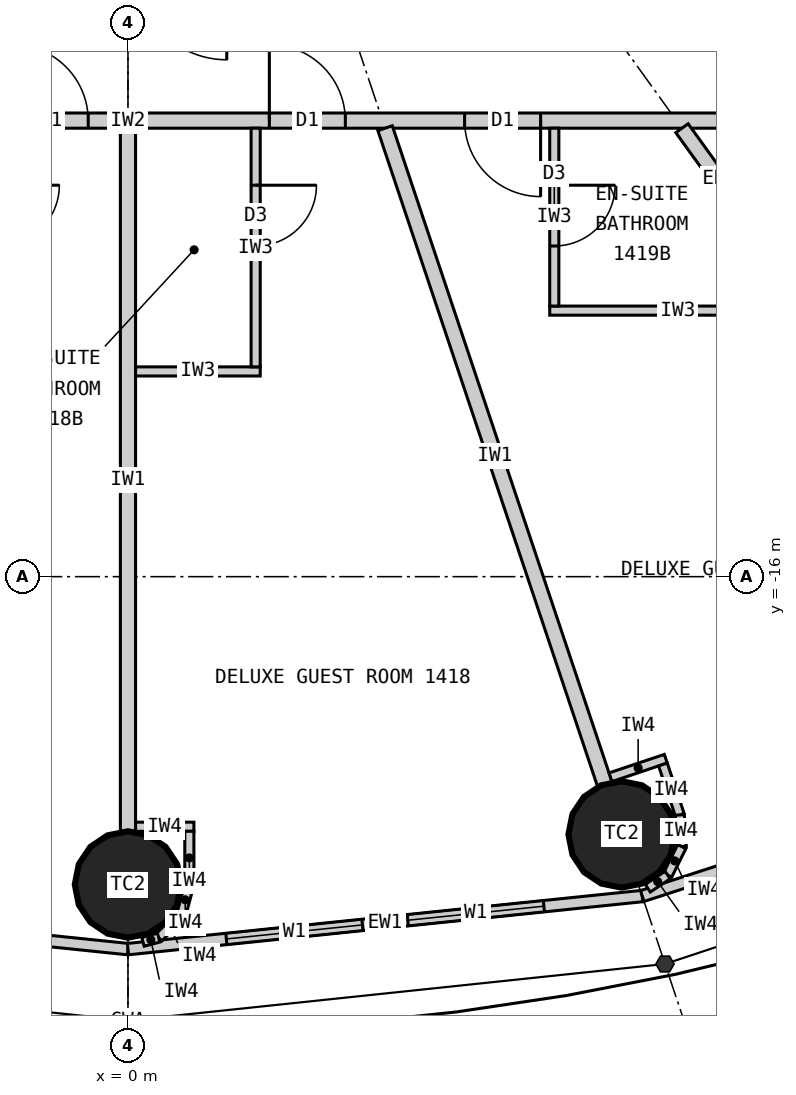
"""IFC4 building model, lengths in metres.
Left out: names, types, materials, properties, quantities, classifications, styles, units other than length and angle.
Written with IfcOpenShell. Run it as: python <this file> out.ifc"""

import sys

from ifc_helpers import new_model, si_unit, direction, frame, frame_2d, origin, origin_2d, place, context, subcontext, project, spatial, rectangle, circle, extrude, element, fill, save


model = new_model("IFC4")
c1 = context("Model", 3, precision=1e-05, world=origin(), true_north=direction((0.0, 1.0)))
c2 = subcontext(c1, "Body", "Model", "MODEL_VIEW")
j1 = project(units=[si_unit("LENGTHUNIT", "METRE"), si_unit("PLANEANGLEUNIT", "RADIAN")], contexts=[c1])
p1 = place(None, origin())
s1 = spatial("IfcSite", under=j1, at=p1, CompositionType="ELEMENT")
p2 = place(p1, origin())
s2 = spatial("IfcBuilding", under=s1, at=p2, CompositionType="ELEMENT")
p3 = place(p2, frame((0.0, 0.0, 60.6)))
s3 = spatial("IfcBuildingStorey", under=s2, at=p3, CompositionType="ELEMENT", Elevation=60.6)
for number, where, z_axis, x_axis in (
    (1, (0.0, -20.05, 0.0), (0.0, 0.0, 1.0), (1.0, 0.0, 0.0)),
    (2, (6.495, -19.391, 0.0), (0.0, 0.0, 1.0), (1.0, 0.0, 0.0)),
):
    element("IfcColumn", number, at=place(p3, frame(where, z_axis=z_axis, x_axis=x_axis)), inside=s3, PredefinedType="COLUMN", context=c2, shape_type="SweptSolid", body=[
        extrude(circle(Radius=0.7, at=origin_2d()), origin(), (0.0, 0.0, 1.0), 3.3),
    ])
p4 = place(p3, frame((-6.766, -20.202, 0.0), z_axis=(0.0, 0.0, 1.0), x_axis=(0.994721394369, -0.102612609291, 0.0)))
e3 = element("IfcWall", 3, at=p4, inside=s3, PredefinedType="ELEMENTEDWALL", context=c2, shape_type="SweptSolid", body=[
    extrude(rectangle(XDim=6.802, YDim=0.15, at=frame_2d((3.401, 0.0))), origin(), (0.0, 0.0, 1.0), 3.12),
])
p5 = place(p4, frame((1.301, 0.0, 0.9)))
e4 = element("IfcOpeningElement", 4, at=p5, cuts=e3, PredefinedType="OPENING", context=c2, shape_type="SweptSolid", body=[
    extrude(rectangle(XDim=1.8, YDim=1.9, at=frame_2d((0.9, 0.95))), frame((0.0, 0.085, 0.0), z_axis=(0.0, -1.0, 0.0), x_axis=(1.0, 0.0, 0.0)), (0.0, 0.0, 1.0), 0.17),
])
p6 = place(p4, frame((3.701, 0.0, 0.9)))
e5 = element("IfcOpeningElement", 5, at=p6, cuts=e3, PredefinedType="OPENING", context=c2, shape_type="SweptSolid", body=[
    extrude(rectangle(XDim=1.8, YDim=1.9, at=frame_2d((0.9, 0.95))), frame((0.0, 0.085, 0.0), z_axis=(0.0, -1.0, 0.0), x_axis=(1.0, 0.0, 0.0)), (0.0, 0.0, 1.0), 0.17),
])
p7 = place(p3, frame((0.0, -20.9, 0.0), z_axis=(0.0, 0.0, 1.0), x_axis=(0.994721394369, 0.102612609291, 0.0)))
e6 = element("IfcWall", 6, at=p7, inside=s3, PredefinedType="ELEMENTEDWALL", context=c2, shape_type="SweptSolid", body=[
    extrude(rectangle(XDim=6.802, YDim=0.15, at=frame_2d((3.401, 0.0))), origin(), (0.0, 0.0, 1.0), 3.12),
])
p8 = place(p7, frame((1.301, 0.0, 0.9)))
e7 = element("IfcOpeningElement", 7, at=p8, cuts=e6, PredefinedType="OPENING", context=c2, shape_type="SweptSolid", body=[
    extrude(rectangle(XDim=1.8, YDim=1.9, at=frame_2d((0.9, 0.95))), frame((0.0, 0.085, 0.0), z_axis=(0.0, -1.0, 0.0), x_axis=(1.0, 0.0, 0.0)), (0.0, 0.0, 1.0), 0.17),
])
p9 = place(p7, frame((3.701, 0.0, 0.9)))
e8 = element("IfcOpeningElement", 8, at=p9, cuts=e6, PredefinedType="OPENING", context=c2, shape_type="SweptSolid", body=[
    extrude(rectangle(XDim=1.8, YDim=1.9, at=frame_2d((0.9, 0.95))), frame((0.0, 0.085, 0.0), z_axis=(0.0, -1.0, 0.0), x_axis=(1.0, 0.0, 0.0)), (0.0, 0.0, 1.0), 0.17),
])
p10 = place(p3, frame((6.766, -20.202, 0.0), z_axis=(0.0, 0.0, 1.0), x_axis=(0.951137534625, 0.308767534285, 0.0)))
e9 = element("IfcWall", 9, at=p10, inside=s3, PredefinedType="ELEMENTEDWALL", context=c2, shape_type="SweptSolid", body=[
    extrude(rectangle(XDim=6.655, YDim=0.15, at=frame_2d((3.328, 0.0))), origin(), (0.0, 0.0, 1.0), 3.12),
])
p11 = place(p10, frame((1.228, 0.0, 0.9)))
e10 = element("IfcOpeningElement", 10, at=p11, cuts=e9, PredefinedType="OPENING", context=c2, shape_type="SweptSolid", body=[
    extrude(rectangle(XDim=1.8, YDim=1.9, at=frame_2d((0.9, 0.95))), frame((0.0, 0.085, 0.0), z_axis=(0.0, -1.0, 0.0), x_axis=(1.0, 0.0, 0.0)), (0.0, 0.0, 1.0), 0.17),
])
p12 = place(p10, frame((3.628, 0.0, 0.9)))
e11 = element("IfcOpeningElement", 11, at=p12, cuts=e9, PredefinedType="OPENING", context=c2, shape_type="SweptSolid", body=[
    extrude(rectangle(XDim=1.8, YDim=1.9, at=frame_2d((0.9, 0.95))), frame((0.0, 0.085, 0.0), z_axis=(0.0, -1.0, 0.0), x_axis=(1.0, 0.0, 0.0)), (0.0, 0.0, 1.0), 0.17),
])
p13 = place(p3, frame((14.1, -10.0, 0.0), z_axis=(0.0, 0.0, 1.0), x_axis=(-1.0, 0.0, 0.0)))
e12 = element("IfcWall", 12, at=p13, inside=s3, PredefinedType="PARTITIONING", context=c2, shape_type="SweptSolid", body=[
    extrude(rectangle(XDim=28.2, YDim=0.2, at=frame_2d((14.1, 0.0))), origin(), (0.0, 0.0, 1.0), 3.12),
])
p14 = place(p13, frame((23.865, 0.0, 0.0)))
e13 = element("IfcOpeningElement", 13, at=p14, cuts=e12, PredefinedType="OPENING", context=c2, shape_type="SweptSolid", body=[
    extrude(rectangle(XDim=1.0, YDim=2.2, at=frame_2d((0.5, 1.1))), frame((0.0, 0.11, 0.0), z_axis=(0.0, -1.0, 0.0), x_axis=(1.0, 0.0, 0.0)), (0.0, 0.0, 1.0), 0.22),
])
p15 = place(p13, frame((18.529, 0.0, 0.0)))
e14 = element("IfcOpeningElement", 14, at=p15, cuts=e12, PredefinedType="OPENING", context=c2, shape_type="SweptSolid", body=[
    extrude(rectangle(XDim=1.0, YDim=2.2, at=frame_2d((0.5, 1.1))), frame((0.0, 0.11, 0.0), z_axis=(0.0, -1.0, 0.0), x_axis=(1.0, 0.0, 0.0)), (0.0, 0.0, 1.0), 0.22),
])
p16 = place(p13, frame((14.623, 0.0, 0.0)))
e15 = element("IfcOpeningElement", 15, at=p16, cuts=e12, PredefinedType="OPENING", context=c2, shape_type="SweptSolid", body=[
    extrude(rectangle(XDim=1.0, YDim=2.2, at=frame_2d((0.5, 1.1))), frame((0.0, 0.11, 0.0), z_axis=(0.0, -1.0, 0.0), x_axis=(1.0, 0.0, 0.0)), (0.0, 0.0, 1.0), 0.22),
])
p17 = place(p13, frame((11.24, 0.0, 0.0)))
e16 = element("IfcOpeningElement", 16, at=p17, cuts=e12, PredefinedType="OPENING", context=c2, shape_type="SweptSolid", body=[
    extrude(rectangle(XDim=1.0, YDim=2.2, at=frame_2d((0.5, 1.1))), frame((0.0, 0.11, 0.0), z_axis=(0.0, -1.0, 0.0), x_axis=(1.0, 0.0, 0.0)), (0.0, 0.0, 1.0), 0.22),
])
p18 = place(p13, frame((8.671, 0.0, 0.0)))
e17 = element("IfcOpeningElement", 17, at=p18, cuts=e12, PredefinedType="OPENING", context=c2, shape_type="SweptSolid", body=[
    extrude(rectangle(XDim=1.0, YDim=2.2, at=frame_2d((0.5, 1.1))), frame((0.0, 0.11, 0.0), z_axis=(0.0, -1.0, 0.0), x_axis=(1.0, 0.0, 0.0)), (0.0, 0.0, 1.0), 0.22),
])
p19 = place(p13, frame((2.801, 0.0, 0.0)))
e18 = element("IfcOpeningElement", 18, at=p19, cuts=e12, PredefinedType="OPENING", context=c2, shape_type="SweptSolid", body=[
    extrude(rectangle(XDim=1.0, YDim=2.2, at=frame_2d((0.5, 1.1))), frame((0.0, 0.11, 0.0), z_axis=(0.0, -1.0, 0.0), x_axis=(1.0, 0.0, 0.0)), (0.0, 0.0, 1.0), 0.22),
])
p20 = place(p3, frame((0.0, -10.1, 0.0), z_axis=(0.0, 0.0, 1.0), x_axis=(0.0, -1.0, 0.0)))
e19 = element("IfcWall", 19, at=p20, inside=s3, PredefinedType="PARTITIONING", context=c2, shape_type="SweptSolid", body=[
    extrude(rectangle(XDim=9.25, YDim=0.2, at=frame_2d((4.625, 0.0))), origin(), (0.0, 0.0, 1.0), 2.32),
])
p21 = place(p3, frame((3.383, -10.1, 0.0), z_axis=(0.0, 0.0, 1.0), x_axis=(0.31759592231, -0.948226149256, 0.0)))
e20 = element("IfcWall", 20, at=p21, inside=s3, PredefinedType="PARTITIONING", context=c2, shape_type="SweptSolid", body=[
    extrude(rectangle(XDim=9.098, YDim=0.2, at=frame_2d((4.549, 0.0))), origin(), (0.0, 0.0, 1.0), 2.32),
])
p22 = place(p3, frame((7.289, -10.1, 0.0), z_axis=(0.0, 0.0, 1.0), x_axis=(0.585198353053, -0.810890182197, 0.0)))
e21 = element("IfcWall", 21, at=p22, inside=s3, PredefinedType="PARTITIONING", context=c2, shape_type="SweptSolid", body=[
    extrude(rectangle(XDim=8.36, YDim=0.2, at=frame_2d((4.18, 0.0))), origin(), (0.0, 0.0, 1.0), 2.32),
])
p23 = place(p3, frame((0.1, -13.3, 0.0), z_axis=(0.0, 0.0, 1.0), x_axis=(1.0, 0.0, 0.0)))
e22 = element("IfcWall", 22, at=p23, inside=s3, PredefinedType="PARTITIONING", context=c2, shape_type="SweptSolid", body=[
    extrude(rectangle(XDim=1.64, YDim=0.12, at=frame_2d((0.82, 0.0))), origin(), (0.0, 0.0, 1.0), 3.12),
])
p24 = place(p3, frame((1.68, -10.1, 0.0), z_axis=(0.0, 0.0, 1.0), x_axis=(0.0, -1.0, 0.0)))
e23 = element("IfcWall", 23, at=p24, inside=s3, PredefinedType="PARTITIONING", context=c2, shape_type="SweptSolid", body=[
    extrude(rectangle(XDim=3.14, YDim=0.12, at=frame_2d((1.57, 0.0))), origin(), (0.0, 0.0, 1.0), 3.12),
])
p25 = place(p24, frame((0.75, 0.0, 0.0)))
e24 = element("IfcOpeningElement", 24, at=p25, cuts=e23, PredefinedType="OPENING", context=c2, shape_type="SweptSolid", body=[
    extrude(rectangle(XDim=0.8, YDim=2.1, at=frame_2d((0.4, 1.05))), frame((0.0, 0.07, 0.0), z_axis=(0.0, -1.0, 0.0), x_axis=(1.0, 0.0, 0.0)), (0.0, 0.0, 1.0), 0.14),
])
p26 = place(p3, frame((8.921, -12.5, 0.0), z_axis=(0.0, 0.0, 1.0), x_axis=(-1.0, 0.0, 0.0)))
e25 = element("IfcWall", 25, at=p26, inside=s3, PredefinedType="PARTITIONING", context=c2, shape_type="SweptSolid", body=[
    extrude(rectangle(XDim=3.372, YDim=0.12, at=frame_2d((1.686, 0.0))), origin(), (0.0, 0.0, 1.0), 3.12),
])
p27 = place(p3, frame((5.609, -10.1, 0.0), z_axis=(0.0, 0.0, 1.0), x_axis=(0.0, -1.0, 0.0)))
e26 = element("IfcWall", 26, at=p27, inside=s3, PredefinedType="PARTITIONING", context=c2, shape_type="SweptSolid", body=[
    extrude(rectangle(XDim=2.34, YDim=0.12, at=frame_2d((1.17, 0.0))), origin(), (0.0, 0.0, 1.0), 3.12),
])
p28 = place(p27, frame((0.75, 0.0, 0.0)))
e27 = element("IfcOpeningElement", 27, at=p28, cuts=e26, PredefinedType="OPENING", context=c2, shape_type="SweptSolid", body=[
    extrude(rectangle(XDim=0.8, YDim=2.1, at=frame_2d((0.4, 1.05))), frame((0.0, 0.07, 0.0), z_axis=(0.0, -1.0, 0.0), x_axis=(1.0, 0.0, 0.0)), (0.0, 0.0, 1.0), 0.14),
])
p29 = place(p3, frame((0.1, -19.29, 0.0), z_axis=(0.0, 0.0, 1.0), x_axis=(1.0, 0.0, 0.0)))
e28 = element("IfcWall", 28, at=p29, inside=s3, PredefinedType="PARTITIONING", context=c2, shape_type="SweptSolid", body=[
    extrude(rectangle(XDim=0.767, YDim=0.12, at=frame_2d((0.384, 0.0))), origin(), (0.0, 0.0, 1.0), 3.12),
])
p30 = place(p3, frame((0.808, -19.35, 0.0), z_axis=(0.0, 0.0, 1.0), x_axis=(0.0, -1.0, 0.0)))
e29 = element("IfcWall", 29, at=p30, inside=s3, PredefinedType="PARTITIONING", context=c2, shape_type="SweptSolid", body=[
    extrude(rectangle(XDim=0.7, YDim=0.12, at=frame_2d((0.35, 0.0))), origin(), (0.0, 0.0, 1.0), 3.12),
])
p31 = place(p3, frame((0.808, -20.05, 0.0), z_axis=(0.0, 0.0, 1.0), x_axis=(-0.2592614205, -0.965807183573, 0.0)))
e30 = element("IfcWall", 30, at=p31, inside=s3, PredefinedType="PARTITIONING", context=c2, shape_type="SweptSolid", body=[
    extrude(rectangle(XDim=0.418, YDim=0.12, at=frame_2d((0.209, 0.0))), origin(), (0.0, 0.0, 1.0), 3.12),
])
p32 = place(p3, frame((0.699, -20.454, 0.0), z_axis=(0.0, 0.0, 1.0), x_axis=(-0.707106781187, -0.707106781187, 0.0)))
e31 = element("IfcWall", 31, at=p32, inside=s3, PredefinedType="PARTITIONING", context=c2, shape_type="SweptSolid", body=[
    extrude(rectangle(XDim=0.418, YDim=0.12, at=frame_2d((0.209, 0.0))), origin(), (0.0, 0.0, 1.0), 3.12),
])
p33 = place(p3, frame((0.404, -20.749, 0.0), z_axis=(0.0, 0.0, 1.0), x_axis=(-0.965759066438, -0.25944060128, 0.0)))
e32 = element("IfcWall", 32, at=p33, inside=s3, PredefinedType="PARTITIONING", context=c2, shape_type="SweptSolid", body=[
    extrude(rectangle(XDim=0.214, YDim=0.12, at=frame_2d((0.107, 0.0))), origin(), (0.0, 0.0, 1.0), 3.12),
])
p34 = place(p3, frame((6.348, -18.639, 0.0), z_axis=(0.0, 0.0, 1.0), x_axis=(0.948268951266, 0.317468102437, 0.0)))
e33 = element("IfcWall", 33, at=p34, inside=s3, PredefinedType="PARTITIONING", context=c2, shape_type="SweptSolid", body=[
    extrude(rectangle(XDim=0.768, YDim=0.12, at=frame_2d((0.384, 0.0))), origin(), (0.0, 0.0, 1.0), 3.12),
])
p35 = place(p3, frame((7.038, -18.471, 0.0), z_axis=(0.0, 0.0, 1.0), x_axis=(0.317378466199, -0.9482989556, 0.0)))
e34 = element("IfcWall", 34, at=p35, inside=s3, PredefinedType="PARTITIONING", context=c2, shape_type="SweptSolid", body=[
    extrude(rectangle(XDim=0.7, YDim=0.12, at=frame_2d((0.35, 0.0))), origin(), (0.0, 0.0, 1.0), 3.12),
])
p36 = place(p3, frame((7.26, -19.135, 0.0), z_axis=(0.0, 0.0, 1.0), x_axis=(0.0613238046, -0.99811792439, 0.0)))
e35 = element("IfcWall", 35, at=p36, inside=s3, PredefinedType="PARTITIONING", context=c2, shape_type="SweptSolid", body=[
    extrude(rectangle(XDim=0.418, YDim=0.12, at=frame_2d((0.209, 0.0))), origin(), (0.0, 0.0, 1.0), 3.12),
])
p37 = place(p3, frame((7.286, -19.552, 0.0), z_axis=(0.0, 0.0, 1.0), x_axis=(-0.445810757773, -0.89512723579, 0.0)))
e36 = element("IfcWall", 36, at=p37, inside=s3, PredefinedType="PARTITIONING", context=c2, shape_type="SweptSolid", body=[
    extrude(rectangle(XDim=0.418, YDim=0.12, at=frame_2d((0.209, 0.0))), origin(), (0.0, 0.0, 1.0), 3.12),
])
p38 = place(p3, frame((7.1, -19.926, 0.0), z_axis=(0.0, 0.0, 1.0), x_axis=(-0.833488262509, -0.552537162787, 0.0)))
e37 = element("IfcWall", 37, at=p38, inside=s3, PredefinedType="PARTITIONING", context=c2, shape_type="SweptSolid", body=[
    extrude(rectangle(XDim=0.313, YDim=0.12, at=frame_2d((0.156, 0.0))), origin(), (0.0, 0.0, 1.0), 3.12),
])
p39 = place(p8, origin())
e38 = element("IfcWindow", 38, at=p39, inside=s3, PartitioningType="SINGLE_PANEL", PredefinedType="WINDOW", context=c2, shape_type="SweptSolid", body=[
    extrude(rectangle(XDim=1.8, YDim=1.9, at=frame_2d((0.9, 0.95))), frame((0.0, 0.03, 0.0), z_axis=(0.0, -1.0, 0.0), x_axis=(1.0, 0.0, 0.0)), (0.0, 0.0, 1.0), 0.06),
])
fill(e7, e38)
p40 = place(p9, origin())
e39 = element("IfcWindow", 39, at=p40, inside=s3, PartitioningType="SINGLE_PANEL", PredefinedType="WINDOW", context=c2, shape_type="SweptSolid", body=[
    extrude(rectangle(XDim=1.8, YDim=1.9, at=frame_2d((0.9, 0.95))), frame((0.0, 0.03, 0.0), z_axis=(0.0, -1.0, 0.0), x_axis=(1.0, 0.0, 0.0)), (0.0, 0.0, 1.0), 0.06),
])
fill(e8, e39)
p41 = place(p16, origin())
e40 = element("IfcDoor", 40, at=p41, inside=s3, OperationType="SINGLE_SWING_RIGHT", PredefinedType="DOOR", context=c2, shape_type="SweptSolid", body=[
    extrude(rectangle(XDim=1.0, YDim=2.2, at=frame_2d((0.5, 1.1))), frame((0.0, 0.025, 0.0), z_axis=(0.0, -1.0, 0.0), x_axis=(1.0, 0.0, 0.0)), (0.0, 0.0, 1.0), 0.05),
])
fill(e15, e40)
p42 = place(p25, origin())
e41 = element("IfcDoor", 41, at=p42, inside=s3, OperationType="SINGLE_SWING_LEFT", PredefinedType="DOOR", context=c2, shape_type="SweptSolid", body=[
    extrude(rectangle(XDim=0.8, YDim=2.1, at=frame_2d((0.4, 1.05))), frame((0.0, 0.025, 0.0), z_axis=(0.0, -1.0, 0.0), x_axis=(1.0, 0.0, 0.0)), (0.0, 0.0, 1.0), 0.05),
])
fill(e24, e41)
p43 = place(p17, origin())
e42 = element("IfcDoor", 42, at=p43, inside=s3, OperationType="SINGLE_SWING_RIGHT", PredefinedType="DOOR", context=c2, shape_type="SweptSolid", body=[
    extrude(rectangle(XDim=1.0, YDim=2.2, at=frame_2d((0.5, 1.1))), frame((0.0, 0.025, 0.0), z_axis=(0.0, -1.0, 0.0), x_axis=(1.0, 0.0, 0.0)), (0.0, 0.0, 1.0), 0.05),
])
fill(e16, e42)
p44 = place(p28, origin())
e43 = element("IfcDoor", 43, at=p44, inside=s3, OperationType="SINGLE_SWING_LEFT", PredefinedType="DOOR", context=c2, shape_type="SweptSolid", body=[
    extrude(rectangle(XDim=0.8, YDim=2.1, at=frame_2d((0.4, 1.05))), frame((0.0, 0.025, 0.0), z_axis=(0.0, -1.0, 0.0), x_axis=(1.0, 0.0, 0.0)), (0.0, 0.0, 1.0), 0.05),
])
fill(e27, e43)
p45 = place(p18, origin())
e44 = element("IfcDoor", 44, at=p45, inside=s3, OperationType="SINGLE_SWING_LEFT", PredefinedType="DOOR", context=c2, shape_type="SweptSolid", body=[
    extrude(rectangle(XDim=1.0, YDim=2.2, at=frame_2d((0.5, 1.1))), frame((0.0, 0.025, 0.0), z_axis=(0.0, -1.0, 0.0), x_axis=(1.0, 0.0, 0.0)), (0.0, 0.0, 1.0), 0.05),
])
fill(e17, e44)
save(model, sys.argv[1])
